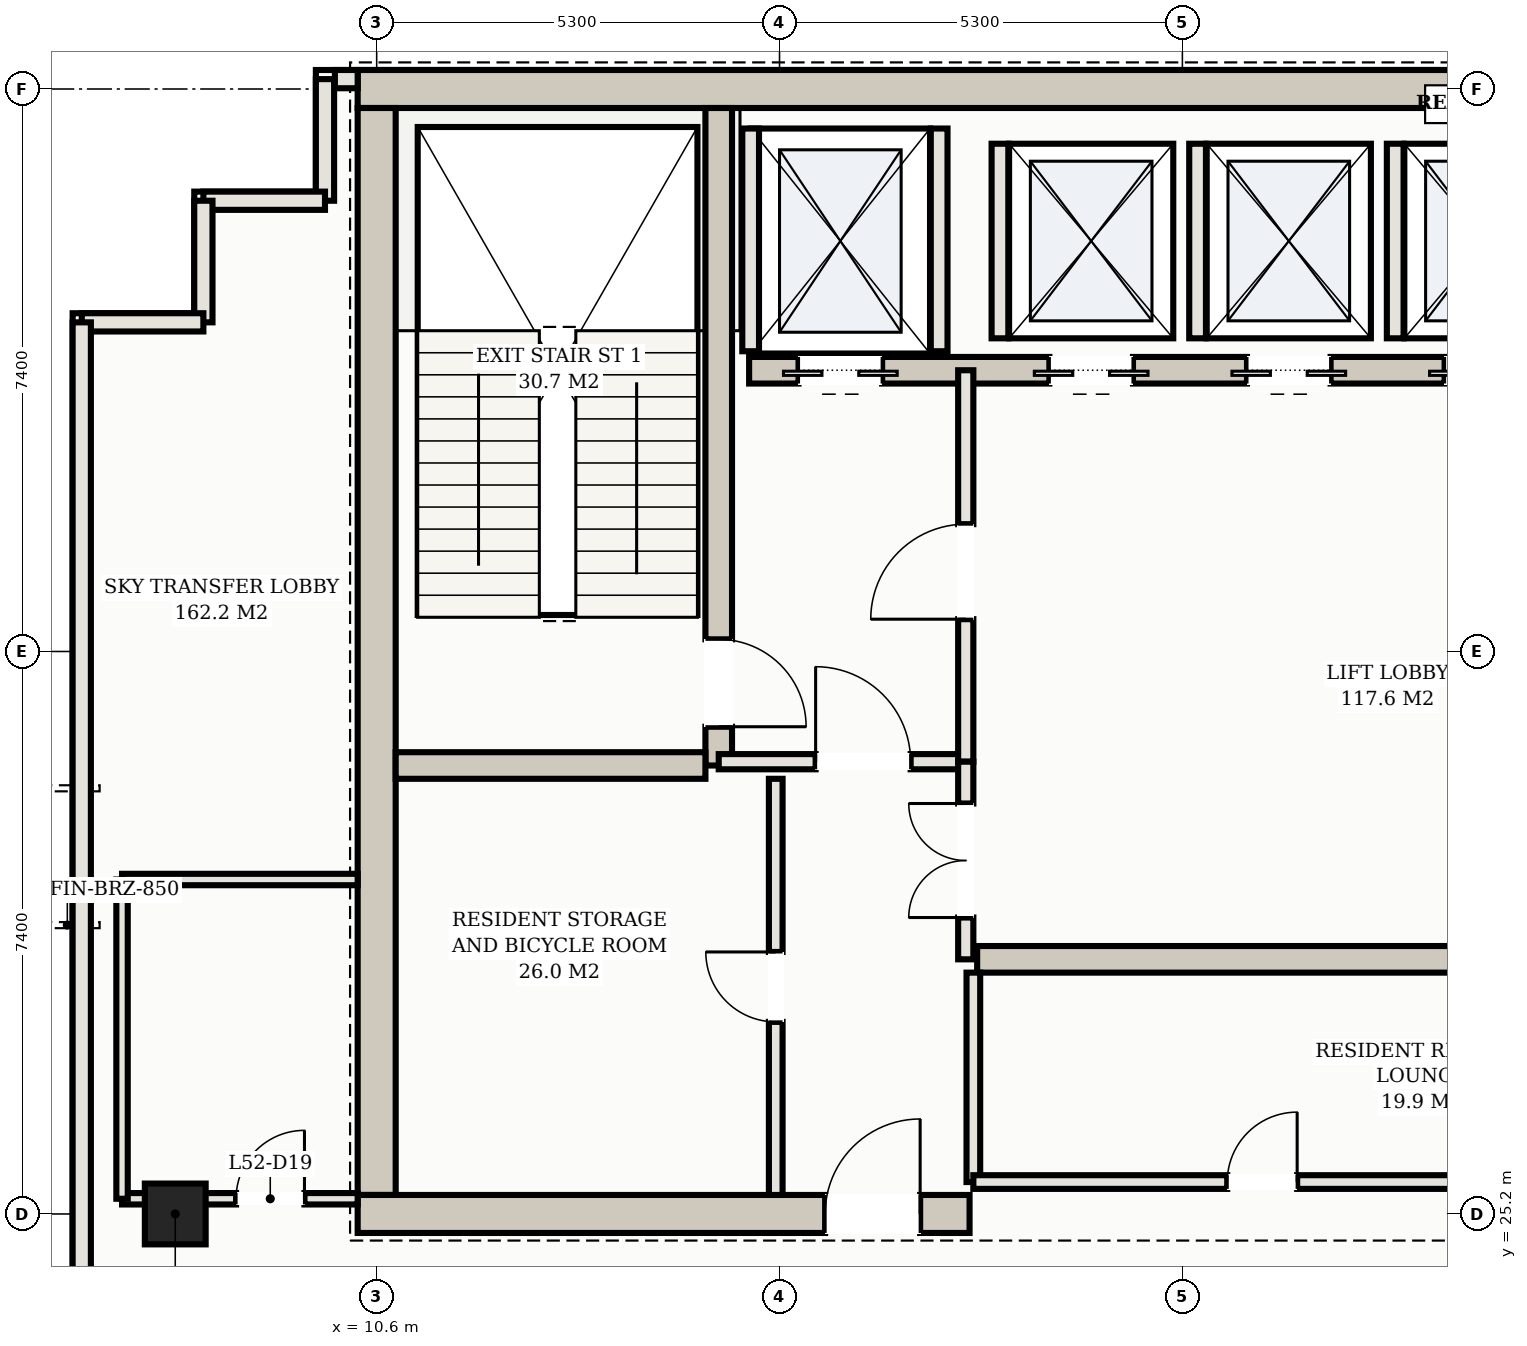
"""IFC4 building model, lengths in metres.
Left out: names, types, materials, properties, quantities, classifications, styles, units other than length and angle.
Written with IfcOpenShell. Run it as: python <this file> out.ifc"""

import sys

from ifc_helpers import new_model, si_unit, direction, frame, frame_2d, origin, origin_2d, place, context, subcontext, project, spatial, rectangle, hollow_rectangle, extrude, element, fill, save


model = new_model("IFC4")
c1 = context("Model", 3, precision=1e-05, world=origin(), true_north=direction((0.0, 1.0)))
c2 = subcontext(c1, "Body", "Model", "MODEL_VIEW")
j1 = project(units=[si_unit("LENGTHUNIT", "METRE"), si_unit("PLANEANGLEUNIT", "RADIAN")], contexts=[c1])
p1 = place(None, origin())
s1 = spatial("IfcSite", under=j1, at=p1, CompositionType="ELEMENT")
p2 = place(p1, origin())
s2 = spatial("IfcBuilding", under=s1, at=p2, CompositionType="ELEMENT")
p3 = place(p2, frame((0.0, 0.0, 192.2)))
s3 = spatial("IfcBuildingStorey", under=s2, at=p3, CompositionType="ELEMENT", Elevation=192.2)
p4 = place(p3, frame((10.35, 40.0, 0.0), z_axis=(0.0, 0.0, 1.0), x_axis=(1.0, 0.0, 0.0)))
e1 = element("IfcWall", 1, at=p4, inside=s3, PredefinedType="SHEAR", context=c2, shape_type="SweptSolid", body=[
    extrude(rectangle(XDim=32.3, YDim=0.5, at=frame_2d((16.15, 0.0))), origin(), (0.0, 0.0, 1.0), 4.31),
])
p5 = place(p3, frame((10.6, 25.45, 0.0), z_axis=(0.0, 0.0, 1.0), x_axis=(0.0, 1.0, 0.0)))
e2 = element("IfcWall", 2, at=p5, inside=s3, PredefinedType="SHEAR", context=c2, shape_type="SweptSolid", body=[
    extrude(rectangle(XDim=14.3, YDim=0.5, at=frame_2d((7.15, 0.0))), origin(), (0.0, 0.0, 1.0), 4.31),
])
p6 = place(p3, frame((10.35, 25.2, 0.0), z_axis=(0.0, 0.0, 1.0), x_axis=(1.0, 0.0, 0.0)))
e3 = element("IfcWall", 3, at=p6, inside=s3, PredefinedType="SHEAR", context=c2, shape_type="SweptSolid", body=[
    extrude(rectangle(XDim=8.05, YDim=0.5, at=frame_2d((4.025, 0.0))), origin(), (0.0, 0.0, 1.0), 4.31),
])
p7 = place(p6, frame((6.15, 0.0, 0.0)))
e4 = element("IfcOpeningElement", 4, at=p7, cuts=e3, PredefinedType="OPENING", context=c2, shape_type="SweptSolid", body=[
    extrude(rectangle(XDim=1.25, YDim=2.2, at=frame_2d((0.625, 1.1))), frame((0.0, 0.26, 0.0), z_axis=(0.0, -1.0, 0.0), x_axis=(1.0, 0.0, 0.0)), (0.0, 0.0, 1.0), 0.52),
])
p8 = place(p3, frame((15.1, 31.1, 0.0), z_axis=(0.0, 0.0, 1.0), x_axis=(0.0, 1.0, 0.0)))
e5 = element("IfcWall", 5, at=p8, inside=s3, PredefinedType="SHEAR", context=c2, shape_type="SweptSolid", body=[
    extrude(rectangle(XDim=8.65, YDim=0.35, at=frame_2d((4.325, 0.0))), origin(), (0.0, 0.0, 1.0), 4.31),
])
p9 = place(p8, frame((0.51, 0.0, 0.0)))
e6 = element("IfcOpeningElement", 6, at=p9, cuts=e5, PredefinedType="OPENING", context=c2, shape_type="SweptSolid", body=[
    extrude(rectangle(XDim=1.15, YDim=2.2, at=frame_2d((0.575, 1.1))), frame((0.0, 0.185, 0.0), z_axis=(0.0, -1.0, 0.0), x_axis=(1.0, 0.0, 0.0)), (0.0, 0.0, 1.0), 0.37),
])
p10 = place(p3, frame((10.85, 31.1, 0.0), z_axis=(0.0, 0.0, 1.0), x_axis=(1.0, 0.0, 0.0)))
e7 = element("IfcWall", 7, at=p10, inside=s3, PredefinedType="SHEAR", context=c2, shape_type="SweptSolid", body=[
    extrude(rectangle(XDim=4.075, YDim=0.35, at=frame_2d((2.038, 0.0))), origin(), (0.0, 0.0, 1.0), 4.31),
])
p11 = place(p3, frame((15.5, 36.3, 0.0), z_axis=(0.0, 0.0, 1.0), x_axis=(1.0, 0.0, 0.0)))
e8 = element("IfcWall", 8, at=p11, inside=s3, PredefinedType="SHEAR", context=c2, shape_type="SweptSolid", body=[
    extrude(rectangle(XDim=22.0, YDim=0.35, at=frame_2d((11.0, 0.0))), origin(), (0.0, 0.0, 1.0), 4.31),
])
p12 = place(p11, frame((0.65, 0.0, 0.0)))
e9 = element("IfcOpeningElement", 9, at=p12, cuts=e8, PredefinedType="OPENING", context=c2, shape_type="SweptSolid", body=[
    extrude(rectangle(XDim=1.1, YDim=2.15, at=frame_2d((0.55, 1.075))), frame((0.0, 0.185, 0.0), z_axis=(0.0, -1.0, 0.0), x_axis=(1.0, 0.0, 0.0)), (0.0, 0.0, 1.0), 0.37),
])
p13 = place(p11, frame((20.25, 0.0, 0.0)))
e10 = element("IfcOpeningElement", 10, at=p13, cuts=e8, PredefinedType="OPENING", context=c2, shape_type="SweptSolid", body=[
    extrude(rectangle(XDim=1.1, YDim=2.15, at=frame_2d((0.55, 1.075))), frame((0.0, 0.185, 0.0), z_axis=(0.0, -1.0, 0.0), x_axis=(1.0, 0.0, 0.0)), (0.0, 0.0, 1.0), 0.37),
])
p14 = place(p11, frame((17.05, 0.0, 0.0)))
e11 = element("IfcOpeningElement", 11, at=p14, cuts=e8, PredefinedType="OPENING", context=c2, shape_type="SweptSolid", body=[
    extrude(rectangle(XDim=1.3, YDim=2.2, at=frame_2d((0.65, 1.1))), frame((0.0, 0.185, 0.0), z_axis=(0.0, -1.0, 0.0), x_axis=(1.0, 0.0, 0.0)), (0.0, 0.0, 1.0), 0.37),
])
p15 = place(p11, frame((3.95, 0.0, 0.0)))
e12 = element("IfcOpeningElement", 12, at=p15, cuts=e8, PredefinedType="OPENING", context=c2, shape_type="SweptSolid", body=[
    extrude(rectangle(XDim=1.1, YDim=2.15, at=frame_2d((0.55, 1.075))), frame((0.0, 0.185, 0.0), z_axis=(0.0, -1.0, 0.0), x_axis=(1.0, 0.0, 0.0)), (0.0, 0.0, 1.0), 0.37),
])
p16 = place(p11, frame((6.55, 0.0, 0.0)))
e13 = element("IfcOpeningElement", 13, at=p16, cuts=e8, PredefinedType="OPENING", context=c2, shape_type="SweptSolid", body=[
    extrude(rectangle(XDim=1.1, YDim=2.15, at=frame_2d((0.55, 1.075))), frame((0.0, 0.185, 0.0), z_axis=(0.0, -1.0, 0.0), x_axis=(1.0, 0.0, 0.0)), (0.0, 0.0, 1.0), 0.37),
])
p17 = place(p11, frame((9.15, 0.0, 0.0)))
e14 = element("IfcOpeningElement", 14, at=p17, cuts=e8, PredefinedType="OPENING", context=c2, shape_type="SweptSolid", body=[
    extrude(rectangle(XDim=1.1, YDim=2.15, at=frame_2d((0.55, 1.075))), frame((0.0, 0.185, 0.0), z_axis=(0.0, -1.0, 0.0), x_axis=(1.0, 0.0, 0.0)), (0.0, 0.0, 1.0), 0.37),
])
p18 = place(p3, frame((18.5, 28.55, 0.0), z_axis=(0.0, 0.0, 1.0), x_axis=(1.0, 0.0, 0.0)))
e15 = element("IfcWall", 15, at=p18, inside=s3, PredefinedType="SHEAR", context=c2, shape_type="SweptSolid", body=[
    extrude(rectangle(XDim=16.0, YDim=0.35, at=frame_2d((8.0, 0.0))), origin(), (0.0, 0.0, 1.0), 4.31),
])
p19 = place(p18, frame((8.95, 0.0, 0.0)))
e16 = element("IfcOpeningElement", 16, at=p19, cuts=e15, PredefinedType="OPENING", context=c2, shape_type="SweptSolid", body=[
    extrude(rectangle(XDim=1.1, YDim=2.15, at=frame_2d((0.55, 1.075))), frame((0.0, 0.185, 0.0), z_axis=(0.0, -1.0, 0.0), x_axis=(1.0, 0.0, 0.0)), (0.0, 0.0, 1.0), 0.37),
])
p20 = place(p18, frame((11.55, 0.0, 0.0)))
e17 = element("IfcOpeningElement", 17, at=p20, cuts=e15, PredefinedType="OPENING", context=c2, shape_type="SweptSolid", body=[
    extrude(rectangle(XDim=1.1, YDim=2.15, at=frame_2d((0.55, 1.075))), frame((0.0, 0.185, 0.0), z_axis=(0.0, -1.0, 0.0), x_axis=(1.0, 0.0, 0.0)), (0.0, 0.0, 1.0), 0.37),
])
p21 = place(p18, frame((14.15, 0.0, 0.0)))
e18 = element("IfcOpeningElement", 18, at=p21, cuts=e15, PredefinedType="OPENING", context=c2, shape_type="SweptSolid", body=[
    extrude(rectangle(XDim=1.1, YDim=2.15, at=frame_2d((0.55, 1.075))), frame((0.0, 0.185, 0.0), z_axis=(0.0, -1.0, 0.0), x_axis=(1.0, 0.0, 0.0)), (0.0, 0.0, 1.0), 0.37),
])
p22 = place(p3, frame((7.95, 25.2, 0.0), z_axis=(0.0, 0.0, 1.0), x_axis=(1.0, 0.0, 0.0)))
e19 = element("IfcColumn", 19, at=p22, inside=s3, PredefinedType="COLUMN", context=c2, shape_type="SweptSolid", body=[
    extrude(hollow_rectangle(XDim=0.8, YDim=0.8, WallThickness=0.028, at=origin_2d()), origin(), (0.0, 0.0, 1.0), 4.5),
])
for number, where, z_axis, x_axis in (
    (20, (15.52, 36.55, 0.0), (0.0, 0.0, 1.0), (0.0, 1.0, 0.0)),
    (21, (18.0, 36.55, 0.0), (0.0, 0.0, 1.0), (0.0, 1.0, 0.0)),
):
    element("IfcWall", number, at=place(p3, frame(where, z_axis=z_axis, x_axis=x_axis)), inside=s3, PredefinedType="SOLIDWALL", context=c2, shape_type="SweptSolid", body=[
        extrude(rectangle(XDim=2.93, YDim=0.22, at=frame_2d((1.465, 0.0))), origin(), (0.0, 0.0, 1.0), 4.31),
    ])
for number, where, z_axis, x_axis in (
    (22, (18.8, 36.72, 0.0), (0.0, 0.0, 1.0), (0.0, 1.0, 0.0)),
    (23, (21.4, 36.72, 0.0), (0.0, 0.0, 1.0), (0.0, 1.0, 0.0)),
    (24, (24.0, 36.72, 0.0), (0.0, 0.0, 1.0), (0.0, 1.0, 0.0)),
):
    element("IfcWall", number, at=place(p3, frame(where, z_axis=z_axis, x_axis=x_axis)), inside=s3, PredefinedType="SOLIDWALL", context=c2, shape_type="SweptSolid", body=[
        extrude(rectangle(XDim=2.56, YDim=0.22, at=frame_2d((1.28, 0.0))), origin(), (0.0, 0.0, 1.0), 4.31),
    ])
p23 = place(p3, frame((10.35, 40.13, 0.0), z_axis=(0.0, 0.0, 1.0), x_axis=(-1.0, 0.0, 0.0)))
e25 = element("IfcWall", 25, at=p23, inside=s3, PredefinedType="SOLIDWALL", context=c2, shape_type="SweptSolid", body=[
    extrude(rectangle(XDim=0.3, YDim=0.24, at=frame_2d((0.15, 0.0))), origin(), (0.0, 0.0, 1.0), 4.31),
])
for number, where, z_axis, x_axis in (
    (26, (9.92, 40.13, 0.0), (0.0, 0.0, 1.0), (0.0, -1.0, 0.0)),
    (27, (9.92, 38.53, 0.0), (0.0, 0.0, 1.0), (-1.0, 0.0, 0.0)),
):
    element("IfcWall", number, at=place(p3, frame(where, z_axis=z_axis, x_axis=x_axis)), inside=s3, PredefinedType="SOLIDWALL", context=c2, shape_type="SweptSolid", body=[
        extrude(rectangle(XDim=1.6, YDim=0.24, at=frame_2d((0.8, 0.0))), origin(), (0.0, 0.0, 1.0), 4.31),
    ])
for number, where, z_axis, x_axis in (
    (28, (8.32, 38.53, 0.0), (0.0, 0.0, 1.0), (0.0, -1.0, 0.0)),
    (29, (8.32, 36.93, 0.0), (0.0, 0.0, 1.0), (-1.0, 0.0, 0.0)),
):
    element("IfcWall", number, at=place(p3, frame(where, z_axis=z_axis, x_axis=x_axis)), inside=s3, PredefinedType="SOLIDWALL", context=c2, shape_type="SweptSolid", body=[
        extrude(rectangle(XDim=1.6, YDim=0.24, at=frame_2d((0.8, 0.0))), origin(), (0.0, 0.0, 1.0), 4.31),
    ])
p24 = place(p3, frame((6.72, 36.93, 0.0), z_axis=(0.0, 0.0, 1.0), x_axis=(0.0, -1.0, 0.0)))
e30 = element("IfcWall", 30, at=p24, inside=s3, PredefinedType="SOLIDWALL", context=c2, shape_type="SweptSolid", body=[
    extrude(rectangle(XDim=26.41, YDim=0.24, at=frame_2d((13.205, 0.0))), origin(), (0.0, 0.0, 1.0), 4.31),
])
p25 = place(p3, frame((15.1, 31.15, 0.0), z_axis=(0.0, 0.0, 1.0), x_axis=(1.0, 0.0, 0.0)))
e31 = element("IfcWall", 31, at=p25, inside=s3, PredefinedType="PARTITIONING", context=c2, shape_type="SweptSolid", body=[
    extrude(rectangle(XDim=3.25, YDim=0.2, at=frame_2d((1.625, 0.0))), origin(), (0.0, 0.0, 1.0), 4.31),
])
p26 = place(p25, frame((1.275, 0.0, 0.0)))
e32 = element("IfcOpeningElement", 32, at=p26, cuts=e31, PredefinedType="OPENING", context=c2, shape_type="SweptSolid", body=[
    extrude(rectangle(XDim=1.25, YDim=2.2, at=frame_2d((0.625, 1.1))), frame((0.0, 0.11, 0.0), z_axis=(0.0, -1.0, 0.0), x_axis=(1.0, 0.0, 0.0)), (0.0, 0.0, 1.0), 0.22),
])
p27 = place(p3, frame((18.35, 31.15, 0.0), z_axis=(0.0, 0.0, 1.0), x_axis=(0.0, 1.0, 0.0)))
e33 = element("IfcWall", 33, at=p27, inside=s3, PredefinedType="PARTITIONING", context=c2, shape_type="SweptSolid", body=[
    extrude(rectangle(XDim=5.15, YDim=0.2, at=frame_2d((2.575, 0.0))), origin(), (0.0, 0.0, 1.0), 4.31),
])
p28 = place(p27, frame((1.875, 0.0, 0.0)))
e34 = element("IfcOpeningElement", 34, at=p28, cuts=e33, PredefinedType="OPENING", context=c2, shape_type="SweptSolid", body=[
    extrude(rectangle(XDim=1.25, YDim=2.2, at=frame_2d((0.625, 1.1))), frame((0.0, 0.11, 0.0), z_axis=(0.0, -1.0, 0.0), x_axis=(1.0, 0.0, 0.0)), (0.0, 0.0, 1.0), 0.22),
])
p29 = place(p3, frame((15.85, 25.45, 0.0), z_axis=(0.0, 0.0, 1.0), x_axis=(0.0, 1.0, 0.0)))
e35 = element("IfcWall", 35, at=p29, inside=s3, PredefinedType="PARTITIONING", context=c2, shape_type="SweptSolid", body=[
    extrude(rectangle(XDim=5.475, YDim=0.18, at=frame_2d((2.738, 0.0))), origin(), (0.0, 0.0, 1.0), 3.655),
])
p30 = place(p29, frame((2.277, 0.0, 0.0)))
e36 = element("IfcOpeningElement", 36, at=p30, cuts=e35, PredefinedType="OPENING", context=c2, shape_type="SweptSolid", body=[
    extrude(rectangle(XDim=0.92, YDim=2.15, at=frame_2d((0.46, 1.075))), frame((0.0, 0.1, 0.0), z_axis=(0.0, -1.0, 0.0), x_axis=(1.0, 0.0, 0.0)), (0.0, 0.0, 1.0), 0.2),
])
p31 = place(p3, frame((18.35, 28.55, 0.0), z_axis=(0.0, 0.0, 1.0), x_axis=(0.0, 1.0, 0.0)))
e37 = element("IfcWall", 37, at=p31, inside=s3, PredefinedType="PARTITIONING", context=c2, shape_type="SweptSolid", body=[
    extrude(rectangle(XDim=2.6, YDim=0.2, at=frame_2d((1.3, 0.0))), origin(), (0.0, 0.0, 1.0), 4.31),
])
p32 = place(p31, frame((0.55, 0.0, 0.0)))
e38 = element("IfcOpeningElement", 38, at=p32, cuts=e37, PredefinedType="OPENING", context=c2, shape_type="SweptSolid", body=[
    extrude(rectangle(XDim=1.5, YDim=2.25, at=frame_2d((0.75, 1.125))), frame((0.0, 0.11, 0.0), z_axis=(0.0, -1.0, 0.0), x_axis=(1.0, 0.0, 0.0)), (0.0, 0.0, 1.0), 0.22),
])
p33 = place(p3, frame((18.45, 25.62, 0.0), z_axis=(0.0, 0.0, 1.0), x_axis=(0.0, 1.0, 0.0)))
e39 = element("IfcWall", 39, at=p33, inside=s3, PredefinedType="PARTITIONING", context=c2, shape_type="SweptSolid", body=[
    extrude(rectangle(XDim=2.755, YDim=0.18, at=frame_2d((1.377, 0.0))), origin(), (0.0, 0.0, 1.0), 4.31),
])
p34 = place(p3, frame((18.45, 25.62, 0.0), z_axis=(0.0, 0.0, 1.0), x_axis=(1.0, 0.0, 0.0)))
e40 = element("IfcWall", 40, at=p34, inside=s3, PredefinedType="PARTITIONING", context=c2, shape_type="SweptSolid", body=[
    extrude(rectangle(XDim=7.9, YDim=0.18, at=frame_2d((3.95, 0.0))), origin(), (0.0, 0.0, 1.0), 4.31),
])
p35 = place(p34, frame((3.34, 0.0, 0.0)))
e41 = element("IfcOpeningElement", 41, at=p35, cuts=e40, PredefinedType="OPENING", context=c2, shape_type="SweptSolid", body=[
    extrude(rectangle(XDim=0.92, YDim=2.15, at=frame_2d((0.46, 1.075))), frame((0.0, 0.1, 0.0), z_axis=(0.0, -1.0, 0.0), x_axis=(1.0, 0.0, 0.0)), (0.0, 0.0, 1.0), 0.2),
])
p36 = place(p3, frame((7.25, 25.4, 0.0), z_axis=(0.0, 0.0, 1.0), x_axis=(1.0, 0.0, 0.0)))
e42 = element("IfcWall", 42, at=p36, inside=s3, PredefinedType="PARTITIONING", context=c2, shape_type="SweptSolid", body=[
    extrude(rectangle(XDim=3.1, YDim=0.15, at=frame_2d((1.55, 0.0))), origin(), (0.0, 0.0, 1.0), 3.655),
])
p37 = place(p36, frame((1.5, 0.0, 0.0)))
e43 = element("IfcOpeningElement", 43, at=p37, cuts=e42, PredefinedType="OPENING", context=c2, shape_type="SweptSolid", body=[
    extrude(rectangle(XDim=0.9, YDim=2.15, at=frame_2d((0.45, 1.075))), frame((0.0, 0.085, 0.0), z_axis=(0.0, -1.0, 0.0), x_axis=(1.0, 0.0, 0.0)), (0.0, 0.0, 1.0), 0.17),
])
p38 = place(p3, frame((7.25, 25.4, 0.0), z_axis=(0.0, 0.0, 1.0), x_axis=(0.0, 1.0, 0.0)))
e44 = element("IfcWall", 44, at=p38, inside=s3, PredefinedType="PARTITIONING", context=c2, shape_type="SweptSolid", body=[
    extrude(rectangle(XDim=4.2, YDim=0.15, at=frame_2d((2.1, 0.0))), origin(), (0.0, 0.0, 1.0), 4.31),
])
p39 = place(p3, frame((7.25, 29.6, 0.0), z_axis=(0.0, 0.0, 1.0), x_axis=(1.0, 0.0, 0.0)))
e45 = element("IfcWall", 45, at=p39, inside=s3, PredefinedType="PARTITIONING", context=c2, shape_type="SweptSolid", body=[
    extrude(rectangle(XDim=3.1, YDim=0.15, at=frame_2d((1.55, 0.0))), origin(), (0.0, 0.0, 1.0), 4.31),
])
p40 = place(p12, frame((1.1, 0.0, 0.0), z_axis=(0.0, 0.0, 1.0), x_axis=(-1.0, 0.0, 0.0)))
e46 = element("IfcDoor", 46, at=p40, inside=s3, OperationType="DOUBLE_DOOR_SLIDING", PredefinedType="DOOR", context=c2, shape_type="SweptSolid", body=[
    extrude(rectangle(XDim=1.1, YDim=2.15, at=frame_2d((0.55, 1.075))), frame((0.0, 0.025, 0.0), z_axis=(0.0, -1.0, 0.0), x_axis=(1.0, 0.0, 0.0)), (0.0, 0.0, 1.0), 0.05),
])
fill(e9, e46)
p41 = place(p15, frame((1.1, 0.0, 0.0), z_axis=(0.0, 0.0, 1.0), x_axis=(-1.0, 0.0, 0.0)))
e47 = element("IfcDoor", 47, at=p41, inside=s3, OperationType="DOUBLE_DOOR_SLIDING", PredefinedType="DOOR", context=c2, shape_type="SweptSolid", body=[
    extrude(rectangle(XDim=1.1, YDim=2.15, at=frame_2d((0.55, 1.075))), frame((0.0, 0.025, 0.0), z_axis=(0.0, -1.0, 0.0), x_axis=(1.0, 0.0, 0.0)), (0.0, 0.0, 1.0), 0.05),
])
fill(e12, e47)
p42 = place(p16, frame((1.1, 0.0, 0.0), z_axis=(0.0, 0.0, 1.0), x_axis=(-1.0, 0.0, 0.0)))
e48 = element("IfcDoor", 48, at=p42, inside=s3, OperationType="DOUBLE_DOOR_SLIDING", PredefinedType="DOOR", context=c2, shape_type="SweptSolid", body=[
    extrude(rectangle(XDim=1.1, YDim=2.15, at=frame_2d((0.55, 1.075))), frame((0.0, 0.025, 0.0), z_axis=(0.0, -1.0, 0.0), x_axis=(1.0, 0.0, 0.0)), (0.0, 0.0, 1.0), 0.05),
])
fill(e13, e48)
p43 = place(p17, frame((1.1, 0.0, 0.0), z_axis=(0.0, 0.0, 1.0), x_axis=(-1.0, 0.0, 0.0)))
e49 = element("IfcDoor", 49, at=p43, inside=s3, OperationType="DOUBLE_DOOR_SLIDING", PredefinedType="DOOR", context=c2, shape_type="SweptSolid", body=[
    extrude(rectangle(XDim=1.1, YDim=2.15, at=frame_2d((0.55, 1.075))), frame((0.0, 0.025, 0.0), z_axis=(0.0, -1.0, 0.0), x_axis=(1.0, 0.0, 0.0)), (0.0, 0.0, 1.0), 0.05),
])
fill(e14, e49)
p44 = place(p7, origin())
e50 = element("IfcDoor", 50, at=p44, inside=s3, OperationType="SINGLE_SWING_RIGHT", PredefinedType="DOOR", context=c2, shape_type="SweptSolid", body=[
    extrude(rectangle(XDim=1.25, YDim=2.2, at=frame_2d((0.625, 1.1))), frame((0.0, 0.025, 0.0), z_axis=(0.0, -1.0, 0.0), x_axis=(1.0, 0.0, 0.0)), (0.0, 0.0, 1.0), 0.05),
])
fill(e4, e50)
p45 = place(p26, origin())
e51 = element("IfcDoor", 51, at=p45, inside=s3, OperationType="SINGLE_SWING_LEFT", PredefinedType="DOOR", context=c2, shape_type="SweptSolid", body=[
    extrude(rectangle(XDim=1.25, YDim=2.2, at=frame_2d((0.625, 1.1))), frame((0.0, 0.025, 0.0), z_axis=(0.0, -1.0, 0.0), x_axis=(1.0, 0.0, 0.0)), (0.0, 0.0, 1.0), 0.05),
])
fill(e32, e51)
p46 = place(p28, origin())
e52 = element("IfcDoor", 52, at=p46, inside=s3, OperationType="SINGLE_SWING_LEFT", PredefinedType="DOOR", context=c2, shape_type="SweptSolid", body=[
    extrude(rectangle(XDim=1.25, YDim=2.2, at=frame_2d((0.625, 1.1))), frame((0.0, 0.025, 0.0), z_axis=(0.0, -1.0, 0.0), x_axis=(1.0, 0.0, 0.0)), (0.0, 0.0, 1.0), 0.05),
])
fill(e34, e52)
p47 = place(p9, frame((1.15, 0.0, 0.0), z_axis=(0.0, 0.0, 1.0), x_axis=(-1.0, 0.0, 0.0)))
e53 = element("IfcDoor", 53, at=p47, inside=s3, OperationType="SINGLE_SWING_RIGHT", PredefinedType="DOOR", context=c2, shape_type="SweptSolid", body=[
    extrude(rectangle(XDim=1.15, YDim=2.2, at=frame_2d((0.575, 1.1))), frame((0.0, 0.025, 0.0), z_axis=(0.0, -1.0, 0.0), x_axis=(1.0, 0.0, 0.0)), (0.0, 0.0, 1.0), 0.05),
])
fill(e6, e53)
p48 = place(p30, origin())
e54 = element("IfcDoor", 54, at=p48, inside=s3, OperationType="SINGLE_SWING_RIGHT", PredefinedType="DOOR", context=c2, shape_type="SweptSolid", body=[
    extrude(rectangle(XDim=0.92, YDim=2.15, at=frame_2d((0.46, 1.075))), frame((0.0, 0.025, 0.0), z_axis=(0.0, -1.0, 0.0), x_axis=(1.0, 0.0, 0.0)), (0.0, 0.0, 1.0), 0.05),
])
fill(e36, e54)
p49 = place(p32, origin())
e55 = element("IfcDoor", 55, at=p49, inside=s3, OperationType="DOUBLE_DOOR_SINGLE_SWING", PredefinedType="DOOR", context=c2, shape_type="SweptSolid", body=[
    extrude(rectangle(XDim=1.5, YDim=2.25, at=frame_2d((0.75, 1.125))), frame((0.0, 0.025, 0.0), z_axis=(0.0, -1.0, 0.0), x_axis=(1.0, 0.0, 0.0)), (0.0, 0.0, 1.0), 0.05),
])
fill(e38, e55)
p50 = place(p35, origin())
e56 = element("IfcDoor", 56, at=p50, inside=s3, OperationType="SINGLE_SWING_RIGHT", PredefinedType="DOOR", context=c2, shape_type="SweptSolid", body=[
    extrude(rectangle(XDim=0.92, YDim=2.15, at=frame_2d((0.46, 1.075))), frame((0.0, 0.025, 0.0), z_axis=(0.0, -1.0, 0.0), x_axis=(1.0, 0.0, 0.0)), (0.0, 0.0, 1.0), 0.05),
])
fill(e41, e56)
p51 = place(p37, origin())
e57 = element("IfcDoor", 57, at=p51, inside=s3, OperationType="SINGLE_SWING_RIGHT", PredefinedType="DOOR", context=c2, shape_type="SweptSolid", body=[
    extrude(rectangle(XDim=0.9, YDim=2.15, at=frame_2d((0.45, 1.075))), frame((0.0, 0.025, 0.0), z_axis=(0.0, -1.0, 0.0), x_axis=(1.0, 0.0, 0.0)), (0.0, 0.0, 1.0), 0.05),
])
fill(e43, e57)
save(model, sys.argv[1])
